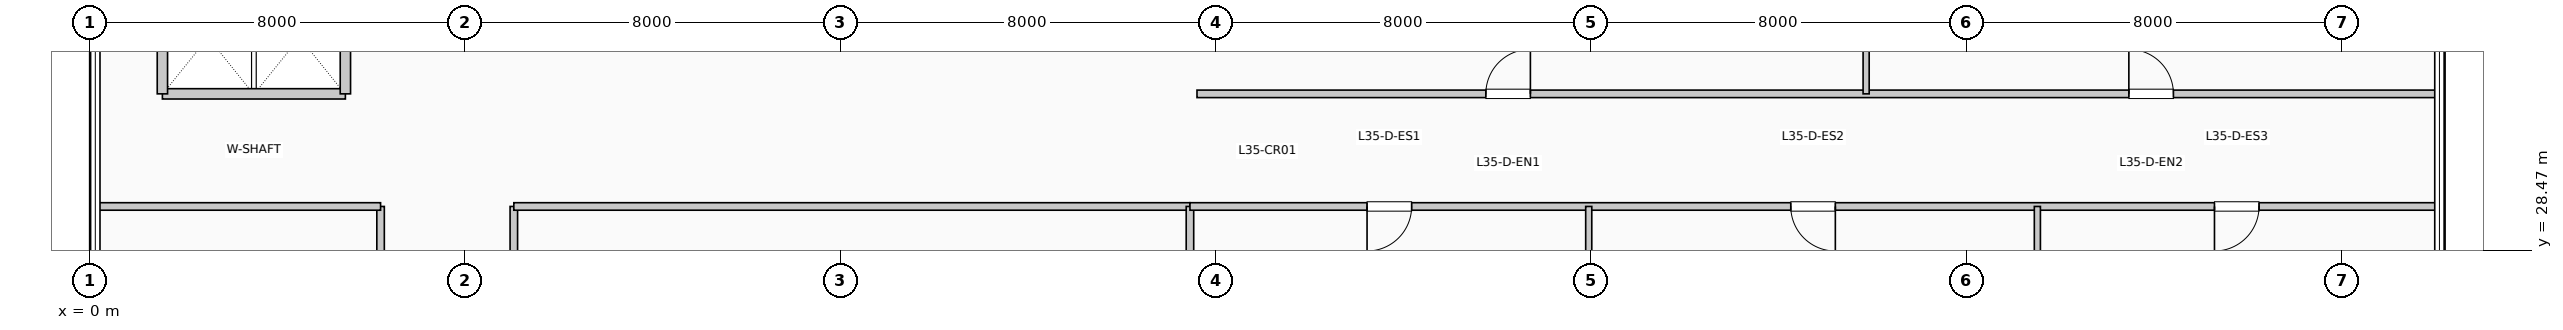
"""IFC4 building model, lengths in metres.
Left out: names, types, materials, properties, quantities, classifications, styles, units other than length and angle.
Written with IfcOpenShell. Run it as: python <this file> out.ifc"""

import sys

from ifc_helpers import new_model, si_unit, direction, frame, frame_2d, origin, place, context, subcontext, project, spatial, rectangle, extrude, element, fill, save


model = new_model("IFC4")
c1 = context("Model", 3, precision=1e-05, world=origin(), true_north=direction((0.0, 1.0)))
c2 = subcontext(c1, "Body", "Model", "MODEL_VIEW")
j1 = project(units=[si_unit("LENGTHUNIT", "METRE"), si_unit("PLANEANGLEUNIT", "RADIAN")], contexts=[c1])
p1 = place(None, origin())
s1 = spatial("IfcSite", under=j1, at=p1, CompositionType="ELEMENT")
p2 = place(p1, origin())
s2 = spatial("IfcBuilding", under=s1, at=p2, CompositionType="ELEMENT")
p3 = place(p2, frame((0.0, 0.0, 146.85)))
s3 = spatial("IfcBuildingStorey", under=s2, at=p3, CompositionType="ELEMENT", Elevation=146.85)
p4 = place(p3, frame((1.55, 31.8, 0.0), z_axis=(0.0, 0.0, 1.0), x_axis=(1.0, 0.0, 0.0)))
e1 = element("IfcWall", 1, at=p4, inside=s3, PredefinedType="PARTITIONING", context=c2, shape_type="SweptSolid", body=[
    extrude(rectangle(XDim=3.9, YDim=0.22, at=frame_2d((1.95, 0.0))), origin(), (0.0, 0.0, 1.0), 3.71),
])
for number, where, z_axis, x_axis in (
    (2, (1.55, 31.8, 0.0), (0.0, 0.0, 1.0), (0.0, 1.0, 0.0)),
    (3, (5.45, 31.8, 0.0), (0.0, 0.0, 1.0), (0.0, 1.0, 0.0)),
):
    element("IfcWall", number, at=place(p3, frame(where, z_axis=z_axis, x_axis=x_axis)), inside=s3, PredefinedType="PARTITIONING", context=c2, shape_type="SweptSolid", body=[
        extrude(rectangle(XDim=2.38, YDim=0.22, at=frame_2d((1.19, 0.0))), origin(), (0.0, 0.0, 1.0), 3.71),
    ])
p5 = place(p3, frame((6.2, 6.8, 0.0), z_axis=(0.0, 0.0, 1.0), x_axis=(0.0, 1.0, 0.0)))
e4 = element("IfcWall", 4, at=p5, inside=s3, PredefinedType="PARTITIONING", context=c2, shape_type="SweptSolid", body=[
    extrude(rectangle(XDim=22.6, YDim=0.16, at=frame_2d((11.3, 0.0))), origin(), (0.0, 0.0, 1.0), 3.71),
])
p6 = place(p5, frame((5.221, 0.0, 0.0), z_axis=(0.0, 0.0, 1.0), x_axis=(-1.0, 0.0, 0.0)))
e5 = element("IfcOpeningElement", 5, at=p6, cuts=e4, PredefinedType="OPENING", context=c2, shape_type="SweptSolid", body=[
    extrude(rectangle(XDim=0.95, YDim=2.15, at=frame_2d((0.475, 1.075))), frame((0.0, 0.09, 0.0), z_axis=(0.0, -1.0, 0.0), x_axis=(1.0, 0.0, 0.0)), (0.0, 0.0, 1.0), 0.18),
])
p7 = place(p5, frame((16.521, 0.0, 0.0), z_axis=(0.0, 0.0, 1.0), x_axis=(-1.0, 0.0, 0.0)))
e6 = element("IfcOpeningElement", 6, at=p7, cuts=e4, PredefinedType="OPENING", context=c2, shape_type="SweptSolid", body=[
    extrude(rectangle(XDim=0.95, YDim=2.15, at=frame_2d((0.475, 1.075))), frame((0.0, 0.09, 0.0), z_axis=(0.0, -1.0, 0.0), x_axis=(1.0, 0.0, 0.0)), (0.0, 0.0, 1.0), 0.18),
])
p8 = place(p3, frame((9.04, 6.8, 0.0), z_axis=(0.0, 0.0, 1.0), x_axis=(0.0, 1.0, 0.0)))
e7 = element("IfcWall", 7, at=p8, inside=s3, PredefinedType="PARTITIONING", context=c2, shape_type="SweptSolid", body=[
    extrude(rectangle(XDim=22.6, YDim=0.16, at=frame_2d((11.3, 0.0))), origin(), (0.0, 0.0, 1.0), 3.71),
])
p9 = place(p8, frame((2.237, 0.0, 0.0)))
e8 = element("IfcOpeningElement", 8, at=p9, cuts=e7, PredefinedType="OPENING", context=c2, shape_type="SweptSolid", body=[
    extrude(rectangle(XDim=0.95, YDim=2.15, at=frame_2d((0.475, 1.075))), frame((0.0, 0.09, 0.0), z_axis=(0.0, -1.0, 0.0), x_axis=(1.0, 0.0, 0.0)), (0.0, 0.0, 1.0), 0.18),
])
p10 = place(p8, frame((8.113, 0.0, 0.0)))
e9 = element("IfcOpeningElement", 9, at=p10, cuts=e7, PredefinedType="OPENING", context=c2, shape_type="SweptSolid", body=[
    extrude(rectangle(XDim=0.95, YDim=2.15, at=frame_2d((0.475, 1.075))), frame((0.0, 0.09, 0.0), z_axis=(0.0, -1.0, 0.0), x_axis=(1.0, 0.0, 0.0)), (0.0, 0.0, 1.0), 0.18),
])
p11 = place(p8, frame((14.215, 0.0, 0.0)))
e10 = element("IfcOpeningElement", 10, at=p11, cuts=e7, PredefinedType="OPENING", context=c2, shape_type="SweptSolid", body=[
    extrude(rectangle(XDim=0.95, YDim=2.15, at=frame_2d((0.475, 1.075))), frame((0.0, 0.09, 0.0), z_axis=(0.0, -1.0, 0.0), x_axis=(1.0, 0.0, 0.0)), (0.0, 0.0, 1.0), 0.18),
])
p12 = place(p8, frame((19.639, 0.0, 0.0)))
e11 = element("IfcOpeningElement", 11, at=p12, cuts=e7, PredefinedType="OPENING", context=c2, shape_type="SweptSolid", body=[
    extrude(rectangle(XDim=0.95, YDim=2.15, at=frame_2d((0.475, 1.075))), frame((0.0, 0.09, 0.0), z_axis=(0.0, -1.0, 0.0), x_axis=(1.0, 0.0, 0.0)), (0.0, 0.0, 1.0), 0.18),
])
p13 = place(p3, frame((0.19, 29.4, 0.0), z_axis=(0.0, 0.0, 1.0), x_axis=(1.0, 0.0, 0.0)))
e12 = element("IfcWall", 12, at=p13, inside=s3, PredefinedType="PARTITIONING", context=c2, shape_type="SweptSolid", body=[
    extrude(rectangle(XDim=6.01, YDim=0.16, at=frame_2d((3.005, 0.0))), origin(), (0.0, 0.0, 1.0), 3.365),
])
p14 = place(p3, frame((9.04, 29.4, 0.0), z_axis=(0.0, 0.0, 1.0), x_axis=(1.0, 0.0, 0.0)))
e13 = element("IfcWall", 13, at=p14, inside=s3, PredefinedType="PARTITIONING", context=c2, shape_type="SweptSolid", body=[
    extrude(rectangle(XDim=14.41, YDim=0.16, at=frame_2d((7.205, 0.0))), origin(), (0.0, 0.0, 1.0), 3.365),
])
p15 = place(p3, frame((23.45, 1.04, 0.0), z_axis=(0.0, 0.0, 1.0), x_axis=(0.0, 1.0, 0.0)))
e14 = element("IfcWall", 14, at=p15, inside=s3, PredefinedType="PARTITIONING", context=c2, shape_type="SweptSolid", body=[
    extrude(rectangle(XDim=28.36, YDim=0.16, at=frame_2d((14.18, 0.0))), origin(), (0.0, 0.0, 1.0), 3.045),
])
p16 = place(p3, frame((23.45, 29.4, 0.0), z_axis=(0.0, 0.0, 1.0), x_axis=(1.0, 0.0, 0.0)))
e15 = element("IfcWall", 15, at=p16, inside=s3, PredefinedType="PARTITIONING", context=c2, shape_type="SweptSolid", body=[
    extrude(rectangle(XDim=26.56, YDim=0.16, at=frame_2d((13.28, 0.0))), origin(), (0.0, 0.0, 1.0), 3.365),
])
p17 = place(p16, frame((4.725, 0.0, 0.0), z_axis=(0.0, 0.0, 1.0), x_axis=(-1.0, 0.0, 0.0)))
e16 = element("IfcOpeningElement", 16, at=p17, cuts=e15, PredefinedType="OPENING", context=c2, shape_type="SweptSolid", body=[
    extrude(rectangle(XDim=0.95, YDim=2.15, at=frame_2d((0.475, 1.075))), frame((0.0, 0.09, 0.0), z_axis=(0.0, -1.0, 0.0), x_axis=(1.0, 0.0, 0.0)), (0.0, 0.0, 1.0), 0.18),
])
p18 = place(p16, frame((13.755, 0.0, 0.0), z_axis=(0.0, 0.0, 1.0), x_axis=(-1.0, 0.0, 0.0)))
e17 = element("IfcOpeningElement", 17, at=p18, cuts=e15, PredefinedType="OPENING", context=c2, shape_type="SweptSolid", body=[
    extrude(rectangle(XDim=0.95, YDim=2.15, at=frame_2d((0.475, 1.075))), frame((0.0, 0.09, 0.0), z_axis=(0.0, -1.0, 0.0), x_axis=(1.0, 0.0, 0.0)), (0.0, 0.0, 1.0), 0.18),
])
p19 = place(p16, frame((22.785, 0.0, 0.0), z_axis=(0.0, 0.0, 1.0), x_axis=(-1.0, 0.0, 0.0)))
e18 = element("IfcOpeningElement", 18, at=p19, cuts=e15, PredefinedType="OPENING", context=c2, shape_type="SweptSolid", body=[
    extrude(rectangle(XDim=0.95, YDim=2.15, at=frame_2d((0.475, 1.075))), frame((0.0, 0.09, 0.0), z_axis=(0.0, -1.0, 0.0), x_axis=(1.0, 0.0, 0.0)), (0.0, 0.0, 1.0), 0.18),
])
p20 = place(p3, frame((23.6, 31.8, 0.0), z_axis=(0.0, 0.0, 1.0), x_axis=(1.0, 0.0, 0.0)))
e19 = element("IfcWall", 19, at=p20, inside=s3, PredefinedType="PARTITIONING", context=c2, shape_type="SweptSolid", body=[
    extrude(rectangle(XDim=26.41, YDim=0.16, at=frame_2d((13.205, 0.0))), origin(), (0.0, 0.0, 1.0), 3.71),
])
p21 = place(p20, frame((6.156, 0.0, 0.0)))
e20 = element("IfcOpeningElement", 20, at=p21, cuts=e19, PredefinedType="OPENING", context=c2, shape_type="SweptSolid", body=[
    extrude(rectangle(XDim=0.95, YDim=2.15, at=frame_2d((0.475, 1.075))), frame((0.0, 0.09, 0.0), z_axis=(0.0, -1.0, 0.0), x_axis=(1.0, 0.0, 0.0)), (0.0, 0.0, 1.0), 0.18),
])
p22 = place(p20, frame((19.861, 0.0, 0.0)))
e21 = element("IfcOpeningElement", 21, at=p22, cuts=e19, PredefinedType="OPENING", context=c2, shape_type="SweptSolid", body=[
    extrude(rectangle(XDim=0.95, YDim=2.15, at=frame_2d((0.475, 1.075))), frame((0.0, 0.09, 0.0), z_axis=(0.0, -1.0, 0.0), x_axis=(1.0, 0.0, 0.0)), (0.0, 0.0, 1.0), 0.18),
])
for number, where, z_axis, x_axis in (
    (22, (31.949, 22.19, 0.0), (0.0, 0.0, 1.0), (0.0, 1.0, 0.0)),
    (23, (41.511, 22.19, 0.0), (0.0, 0.0, 1.0), (0.0, 1.0, 0.0)),
):
    element("IfcWall", number, at=place(p3, frame(where, z_axis=z_axis, x_axis=x_axis)), inside=s3, PredefinedType="PARTITIONING", context=c2, shape_type="SweptSolid", body=[
        extrude(rectangle(XDim=7.21, YDim=0.13, at=frame_2d((3.605, 0.0))), origin(), (0.0, 0.0, 1.0), 3.71),
    ])
p23 = place(p3, frame((37.861, 31.8, 0.0), z_axis=(0.0, 0.0, 1.0), x_axis=(0.0, 1.0, 0.0)))
e24 = element("IfcWall", 24, at=p23, inside=s3, PredefinedType="PARTITIONING", context=c2, shape_type="SweptSolid", body=[
    extrude(rectangle(XDim=14.01, YDim=0.13, at=frame_2d((7.005, 0.0))), origin(), (0.0, 0.0, 1.0), 3.71),
])
p24 = place(p17, origin())
e25 = element("IfcDoor", 25, at=p24, inside=s3, OperationType="SINGLE_SWING_LEFT", PredefinedType="DOOR", context=c2, shape_type="SweptSolid", body=[
    extrude(rectangle(XDim=0.95, YDim=2.15, at=frame_2d((0.475, 1.075))), frame((0.0, 0.025, 0.0), z_axis=(0.0, -1.0, 0.0), x_axis=(1.0, 0.0, 0.0)), (0.0, 0.0, 1.0), 0.05),
])
fill(e16, e25)
p25 = place(p18, origin())
e26 = element("IfcDoor", 26, at=p25, inside=s3, OperationType="SINGLE_SWING_RIGHT", PredefinedType="DOOR", context=c2, shape_type="SweptSolid", body=[
    extrude(rectangle(XDim=0.95, YDim=2.15, at=frame_2d((0.475, 1.075))), frame((0.0, 0.025, 0.0), z_axis=(0.0, -1.0, 0.0), x_axis=(1.0, 0.0, 0.0)), (0.0, 0.0, 1.0), 0.05),
])
fill(e17, e26)
p26 = place(p19, origin())
e27 = element("IfcDoor", 27, at=p26, inside=s3, OperationType="SINGLE_SWING_LEFT", PredefinedType="DOOR", context=c2, shape_type="SweptSolid", body=[
    extrude(rectangle(XDim=0.95, YDim=2.15, at=frame_2d((0.475, 1.075))), frame((0.0, 0.025, 0.0), z_axis=(0.0, -1.0, 0.0), x_axis=(1.0, 0.0, 0.0)), (0.0, 0.0, 1.0), 0.05),
])
fill(e18, e27)
p27 = place(p21, origin())
e28 = element("IfcDoor", 28, at=p27, inside=s3, OperationType="SINGLE_SWING_RIGHT", PredefinedType="DOOR", context=c2, shape_type="SweptSolid", body=[
    extrude(rectangle(XDim=0.95, YDim=2.15, at=frame_2d((0.475, 1.075))), frame((0.0, 0.025, 0.0), z_axis=(0.0, -1.0, 0.0), x_axis=(1.0, 0.0, 0.0)), (0.0, 0.0, 1.0), 0.05),
])
fill(e20, e28)
p28 = place(p22, origin())
e29 = element("IfcDoor", 29, at=p28, inside=s3, OperationType="SINGLE_SWING_LEFT", PredefinedType="DOOR", context=c2, shape_type="SweptSolid", body=[
    extrude(rectangle(XDim=0.95, YDim=2.15, at=frame_2d((0.475, 1.075))), frame((0.0, 0.025, 0.0), z_axis=(0.0, -1.0, 0.0), x_axis=(1.0, 0.0, 0.0)), (0.0, 0.0, 1.0), 0.05),
])
fill(e21, e29)
save(model, sys.argv[1])
